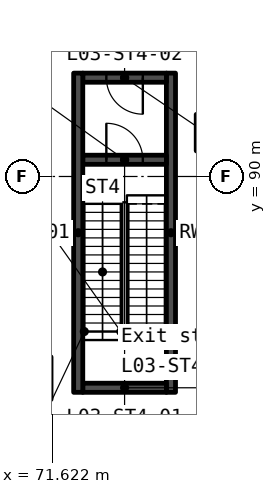
"""IFC4 building model, lengths in metres.
Left out: names, types, materials, properties, quantities, classifications, styles, units other than length and angle.
Written with IfcOpenShell. Run it as: python <this file> out.ifc"""

import sys

from ifc_helpers import new_model, si_unit, direction, frame, frame_2d, origin, origin_2d, place, context, subcontext, project, spatial, rectangle, extrude, element, fill, save


model = new_model("IFC4")
c1 = context("Model", 3, precision=1e-05, world=origin(), true_north=direction((0.0, 1.0)))
c2 = subcontext(c1, "Body", "Model", "MODEL_VIEW")
j1 = project(units=[si_unit("LENGTHUNIT", "METRE"), si_unit("PLANEANGLEUNIT", "RADIAN")], contexts=[c1])
p1 = place(None, origin())
s1 = spatial("IfcSite", under=j1, at=p1, CompositionType="ELEMENT")
p2 = place(p1, origin())
s2 = spatial("IfcBuilding", under=s1, at=p2, CompositionType="ELEMENT")
p3 = place(p2, frame((0.0, 0.0, 19.5)))
s3 = spatial("IfcBuildingStorey", under=s2, at=p3, CompositionType="ELEMENT", Elevation=19.5)
p4 = place(p3, frame((76.956, 91.442, 0.0), z_axis=(0.0, 0.0, 1.0), x_axis=(1.0, 0.0, 0.0)))
e1 = element("IfcColumn", 1, at=p4, inside=s3, PredefinedType="COLUMN", context=c2, shape_type="SweptSolid", body=[
    extrude(rectangle(XDim=1.2, YDim=1.2, at=origin_2d()), origin(), (0.0, 0.0, 1.0), 5.5),
])
for number, where, z_axis, x_axis in (
    (2, (72.475, 82.9, 0.0), (0.0, 0.0, 1.0), (0.0, 1.0, 0.0)),
    (3, (75.525, 82.9, 0.0), (0.0, 0.0, 1.0), (0.0, 1.0, 0.0)),
):
    element("IfcWall", number, at=place(p3, frame(where, z_axis=z_axis, x_axis=x_axis)), inside=s3, PredefinedType="SOLIDWALL", context=c2, shape_type="SweptSolid", body=[
        extrude(rectangle(XDim=10.5, YDim=0.3, at=frame_2d((5.25, 0.0))), origin(), (0.0, 0.0, 1.0), 5.25),
    ])
p5 = place(p3, frame((72.625, 83.05, 0.0), z_axis=(0.0, 0.0, 1.0), x_axis=(1.0, 0.0, 0.0)))
e4 = element("IfcWall", 4, at=p5, inside=s3, PredefinedType="SOLIDWALL", context=c2, shape_type="SweptSolid", body=[
    extrude(rectangle(XDim=2.75, YDim=0.3, at=frame_2d((1.375, 0.0))), origin(), (0.0, 0.0, 1.0), 5.25),
])
p6 = place(p3, frame((72.625, 90.55, 0.0), z_axis=(0.0, 0.0, 1.0), x_axis=(1.0, 0.0, 0.0)))
e5 = element("IfcWall", 5, at=p6, inside=s3, PredefinedType="SOLIDWALL", context=c2, shape_type="SweptSolid", body=[
    extrude(rectangle(XDim=2.75, YDim=0.3, at=frame_2d((1.375, 0.0))), origin(), (0.0, 0.0, 1.0), 5.25),
])
p7 = place(p6, frame((0.775, 0.0, 0.0)))
e6 = element("IfcOpeningElement", 6, at=p7, cuts=e5, PredefinedType="OPENING", context=c2, shape_type="SweptSolid", body=[
    extrude(rectangle(XDim=1.2, YDim=2.1, at=frame_2d((0.6, 1.05))), frame((0.0, 0.16, 0.0), z_axis=(0.0, -1.0, 0.0), x_axis=(1.0, 0.0, 0.0)), (0.0, 0.0, 1.0), 0.32),
])
p8 = place(p3, frame((72.625, 93.25, 0.0), z_axis=(0.0, 0.0, 1.0), x_axis=(1.0, 0.0, 0.0)))
e7 = element("IfcWall", 7, at=p8, inside=s3, PredefinedType="SOLIDWALL", context=c2, shape_type="SweptSolid", body=[
    extrude(rectangle(XDim=2.75, YDim=0.3, at=frame_2d((1.375, 0.0))), origin(), (0.0, 0.0, 1.0), 5.25),
])
p9 = place(p8, frame((0.775, 0.0, 0.0)))
e8 = element("IfcOpeningElement", 8, at=p9, cuts=e7, PredefinedType="OPENING", context=c2, shape_type="SweptSolid", body=[
    extrude(rectangle(XDim=1.2, YDim=2.1, at=frame_2d((0.6, 1.05))), frame((0.0, 0.16, 0.0), z_axis=(0.0, -1.0, 0.0), x_axis=(1.0, 0.0, 0.0)), (0.0, 0.0, 1.0), 0.32),
])
p10 = place(p3, frame((77.166, 51.679, 0.0), z_axis=(0.0, 0.0, 1.0), x_axis=(-0.500001590908, 0.866024485271, 0.0)))
e9 = element("IfcWall", 9, at=p10, inside=s3, PredefinedType="STANDARD", context=c2, shape_type="SweptSolid", body=[
    extrude(rectangle(XDim=89.388, YDim=1.0, at=frame_2d((44.694, 0.0))), origin(), (0.0, 0.0, 1.0), 0.6),
])
p11 = place(p7, origin())
e10 = element("IfcDoor", 10, at=p11, inside=s3, OperationType="SINGLE_SWING_LEFT", PredefinedType="DOOR", context=c2, shape_type="SweptSolid", body=[
    extrude(rectangle(XDim=1.2, YDim=2.1, at=frame_2d((0.6, 1.05))), frame((0.0, 0.025, 0.0), z_axis=(0.0, -1.0, 0.0), x_axis=(1.0, 0.0, 0.0)), (0.0, 0.0, 1.0), 0.05),
])
fill(e6, e10)
p12 = place(p9, origin())
e11 = element("IfcDoor", 11, at=p12, inside=s3, OperationType="SINGLE_SWING_RIGHT", PredefinedType="DOOR", context=c2, shape_type="SweptSolid", body=[
    extrude(rectangle(XDim=1.2, YDim=2.1, at=frame_2d((0.6, 1.05))), frame((0.0, 0.025, 0.0), z_axis=(0.0, -1.0, 0.0), x_axis=(1.0, 0.0, 0.0)), (0.0, 0.0, 1.0), 0.05),
])
fill(e8, e11)
save(model, sys.argv[1])
